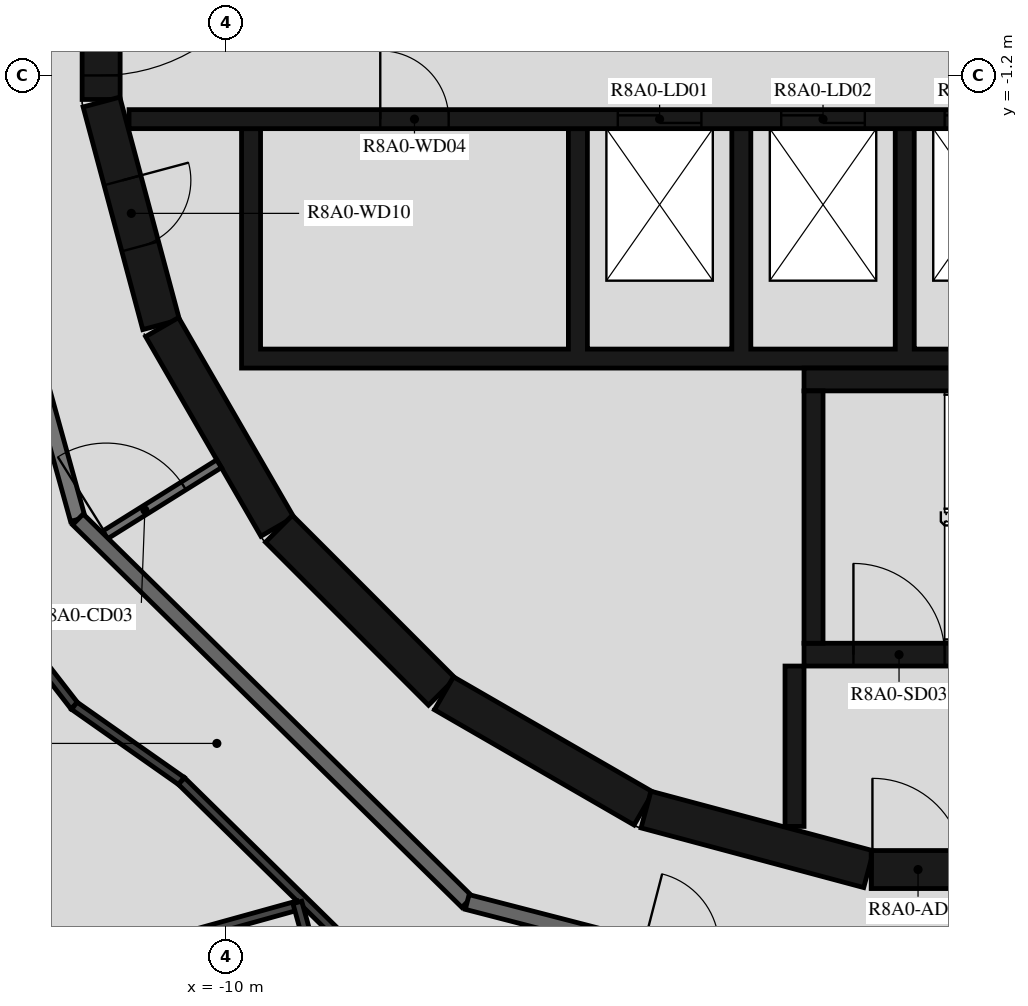
"""IFC4 building model, lengths in metres.
Left out: names, types, materials, properties, quantities, classifications, styles, units other than length and angle.
Written with IfcOpenShell. Run it as: python <this file> out.ifc"""

import sys

from ifc_helpers import new_model, si_unit, direction, frame, frame_2d, origin, place, context, subcontext, project, spatial, polyline, rectangle, outline, extrude, element, fill, save


model = new_model("IFC4")
c1 = context("Model", 3, precision=1e-05, world=origin(), true_north=direction((0.0, 1.0)))
c2 = subcontext(c1, "Body", "Model", "MODEL_VIEW")
j1 = project(units=[si_unit("LENGTHUNIT", "METRE"), si_unit("PLANEANGLEUNIT", "RADIAN")], contexts=[c1])
p1 = place(None, origin())
s1 = spatial("IfcSite", under=j1, at=p1, CompositionType="ELEMENT")
p2 = place(p1, origin())
s2 = spatial("IfcBuilding", under=s1, at=p2, CompositionType="ELEMENT")
p3 = place(p2, frame((0.0, 0.0, 298.2)))
s3 = spatial("IfcBuildingStorey", under=s2, at=p3, CompositionType="ELEMENT", Elevation=298.2)
p4 = place(p3, frame((-11.647, 1.516, 0.0), z_axis=(0.0, 0.0, 1.0), x_axis=(0.0, -1.0, 0.0)))
e1 = element("IfcWall", 1, at=p4, inside=s3, PredefinedType="SHEAR", context=c2, shape_type="SweptSolid", body=[
    extrude(rectangle(XDim=3.033, YDim=0.5, at=frame_2d((1.516, 0.0))), origin(), (0.0, 0.0, 1.0), 3.12),
])
p5 = place(p4, frame((0.316, 0.0, 0.0)))
e2 = element("IfcOpeningElement", 2, at=p5, cuts=e1, PredefinedType="OPENING", context=c2, shape_type="SweptSolid", body=[
    extrude(rectangle(XDim=2.4, YDim=2.1, at=frame_2d((1.2, 1.05))), frame((0.0, 0.26, 0.0), z_axis=(0.0, -1.0, 0.0), x_axis=(1.0, 0.0, 0.0)), (0.0, 0.0, 1.0), 0.52),
])
p6 = place(p3, frame((-11.643, -1.55, 0.0), z_axis=(0.0, 0.0, 1.0), x_axis=(0.258734743916, -0.965948410781, 0.0)))
e3 = element("IfcWall", 3, at=p6, inside=s3, PredefinedType="SHEAR", context=c2, shape_type="SweptSolid", body=[
    extrude(rectangle(XDim=3.033, YDim=0.5, at=frame_2d((1.516, 0.0))), origin(), (0.0, 0.0, 1.0), 3.12),
])
p7 = place(p6, frame((1.066, 0.0, 0.0)))
e4 = element("IfcOpeningElement", 4, at=p7, cuts=e3, PredefinedType="OPENING", context=c2, shape_type="SweptSolid", body=[
    extrude(rectangle(XDim=0.9, YDim=2.1, at=frame_2d((0.45, 1.05))), frame((0.0, 0.26, 0.0), z_axis=(0.0, -1.0, 0.0), x_axis=(1.0, 0.0, 0.0)), (0.0, 0.0, 1.0), 0.52),
])
p8 = place(p3, frame((-10.845, -4.51, 0.0), z_axis=(0.0, 0.0, 1.0), x_axis=(0.500087131594, -0.865975092491, 0.0)))
e5 = element("IfcWall", 5, at=p8, inside=s3, PredefinedType="SHEAR", context=c2, shape_type="SweptSolid", body=[
    extrude(rectangle(XDim=3.033, YDim=0.5, at=frame_2d((1.516, 0.0))), origin(), (0.0, 0.0, 1.0), 3.12),
])
p9 = place(p3, frame((-9.308, -7.164, 0.0), z_axis=(0.0, 0.0, 1.0), x_axis=(0.707106781187, -0.707106781187, 0.0)))
e6 = element("IfcWall", 6, at=p9, inside=s3, PredefinedType="SHEAR", context=c2, shape_type="SweptSolid", body=[
    extrude(rectangle(XDim=3.032, YDim=0.5, at=frame_2d((1.516, 0.0))), origin(), (0.0, 0.0, 1.0), 3.12),
])
for number, where, z_axis, x_axis in (
    (7, (-7.137, -9.329, 0.0), (0.0, 0.0, 1.0), (0.866, -0.5, 0.0)),
    (8, (-4.479, -10.858, 0.0), (0.0, 0.0, 1.0), (0.966, -0.259, 0.0)),
):
    element("IfcWall", number, at=place(p3, frame(where, z_axis=z_axis, x_axis=x_axis)), inside=s3, PredefinedType="SHEAR", context=c2, shape_type="SweptSolid", body=[
        extrude(rectangle(XDim=3.033, YDim=0.5, at=frame_2d((1.516, 0.0))), origin(), (0.0, 0.0, 1.0), 3.12),
    ])
p10 = place(p3, frame((-1.516, -11.647, 0.0), z_axis=(0.0, 0.0, 1.0), x_axis=(1.0, 0.0, 0.0)))
e9 = element("IfcWall", 9, at=p10, inside=s3, PredefinedType="SHEAR", context=c2, shape_type="SweptSolid", body=[
    extrude(rectangle(XDim=3.033, YDim=0.5, at=frame_2d((1.516, 0.0))), origin(), (0.0, 0.0, 1.0), 3.12),
])
p11 = place(p10, frame((0.016, 0.0, 0.0)))
e10 = element("IfcOpeningElement", 10, at=p11, cuts=e9, PredefinedType="OPENING", context=c2, shape_type="SweptSolid", body=[
    extrude(rectangle(XDim=1.2, YDim=2.1, at=frame_2d((0.6, 1.05))), frame((0.0, 0.26, 0.0), z_axis=(0.0, -1.0, 0.0), x_axis=(1.0, 0.0, 0.0)), (0.0, 0.0, 1.0), 0.52),
])
p12 = place(p3, frame((-2.275, -8.67, 0.0), z_axis=(0.0, 0.0, 1.0), x_axis=(0.0, 1.0, 0.0)))
e11 = element("IfcWall", 11, at=p12, inside=s3, PredefinedType="SHEAR", context=c2, shape_type="SweptSolid", body=[
    extrude(rectangle(XDim=3.32, YDim=0.25, at=frame_2d((1.66, 0.0))), origin(), (0.0, 0.0, 1.0), 3.12),
])
p13 = place(p3, frame((-2.4, -5.2, 0.0), z_axis=(0.0, 0.0, 1.0), x_axis=(1.0, 0.0, 0.0)))
e12 = element("IfcWall", 12, at=p13, inside=s3, PredefinedType="SHEAR", context=c2, shape_type="SweptSolid", body=[
    extrude(rectangle(XDim=7.05, YDim=0.3, at=frame_2d((3.525, 0.0))), origin(), (0.0, 0.0, 1.0), 3.12),
])
p14 = place(p3, frame((-2.4, -8.82, 0.0), z_axis=(0.0, 0.0, 1.0), x_axis=(1.0, 0.0, 0.0)))
e13 = element("IfcWall", 13, at=p14, inside=s3, PredefinedType="SHEAR", context=c2, shape_type="SweptSolid", body=[
    extrude(rectangle(XDim=2.5, YDim=0.3, at=frame_2d((1.25, 0.0))), origin(), (0.0, 0.0, 1.0), 3.12),
])
p15 = place(p14, frame((0.65, 0.0, 0.0)))
e14 = element("IfcOpeningElement", 14, at=p15, cuts=e13, PredefinedType="OPENING", context=c2, shape_type="SweptSolid", body=[
    extrude(rectangle(XDim=1.2, YDim=2.1, at=frame_2d((0.6, 1.05))), frame((0.0, 0.16, 0.0), z_axis=(0.0, -1.0, 0.0), x_axis=(1.0, 0.0, 0.0)), (0.0, 0.0, 1.0), 0.32),
])
p16 = place(p3, frame((-2.525, -8.97, 0.0), z_axis=(0.0, 0.0, 1.0), x_axis=(0.0, -1.0, 0.0)))
e15 = element("IfcWall", 15, at=p16, inside=s3, PredefinedType="SHEAR", context=c2, shape_type="SweptSolid", body=[
    extrude(rectangle(XDim=2.11, YDim=0.25, at=frame_2d((1.055, 0.0))), origin(), (0.0, 0.0, 1.0), 3.12),
])
p17 = place(p3, origin())
e16 = element("IfcWall", 16, at=p17, inside=s3, PredefinedType="SHEAR", context=c2, shape_type="SweptSolid", body=[
    extrude(outline(polyline([(9.8, -5.05), (9.8, -4.8), (9.8, -1.9), (9.55, -1.9), (9.55, -4.8), (7.65, -4.8), (7.65, -1.9), (7.4, -1.9), (7.4, -4.8), (5.5, -4.8), (5.5, -1.9), (5.25, -1.9), (5.25, -4.8), (3.35, -4.8), (3.35, -1.9), (3.1, -1.9), (3.1, -4.8), (1.2, -4.8), (1.2, -1.9), (0.95, -1.9), (0.95, -4.8), (-0.95, -4.8), (-0.95, -1.9), (-1.2, -1.9), (-1.2, -4.8), (-3.1, -4.8), (-3.1, -1.9), (-3.35, -1.9), (-3.35, -4.8), (-5.25, -4.8), (-5.25, -1.9), (-5.5, -1.9), (-5.5, -4.8), (-9.55, -4.8), (-9.55, -1.9), (-9.8, -1.9), (-9.8, -4.8), (-9.8, -5.05), (9.8, -5.05)])), origin(), (0.0, 0.0, 1.0), 3.12),
])
p18 = place(p3, frame((-11.28, -1.775, 0.0), z_axis=(0.0, 0.0, 1.0), x_axis=(1.0, 0.0, 0.0)))
e17 = element("IfcWall", 17, at=p18, inside=s3, PredefinedType="SHEAR", context=c2, shape_type="SweptSolid", body=[
    extrude(rectangle(XDim=14.38, YDim=0.25, at=frame_2d((7.19, 0.0))), origin(), (0.0, 0.0, 1.0), 3.12),
])
p19 = place(p18, frame((6.43, 0.0, 0.0)))
e18 = element("IfcOpeningElement", 18, at=p19, cuts=e17, PredefinedType="OPENING", context=c2, shape_type="SweptSolid", body=[
    extrude(rectangle(XDim=1.1, YDim=2.1, at=frame_2d((0.55, 1.05))), frame((0.0, 0.135, 0.0), z_axis=(0.0, -1.0, 0.0), x_axis=(1.0, 0.0, 0.0)), (0.0, 0.0, 1.0), 0.27),
])
p20 = place(p18, frame((8.58, 0.0, 0.0)))
e19 = element("IfcOpeningElement", 19, at=p20, cuts=e17, PredefinedType="OPENING", context=c2, shape_type="SweptSolid", body=[
    extrude(rectangle(XDim=1.1, YDim=2.1, at=frame_2d((0.55, 1.05))), frame((0.0, 0.135, 0.0), z_axis=(0.0, -1.0, 0.0), x_axis=(1.0, 0.0, 0.0)), (0.0, 0.0, 1.0), 0.27),
])
p21 = place(p18, frame((10.73, 0.0, 0.0)))
e20 = element("IfcOpeningElement", 20, at=p21, cuts=e17, PredefinedType="OPENING", context=c2, shape_type="SweptSolid", body=[
    extrude(rectangle(XDim=1.1, YDim=2.1, at=frame_2d((0.55, 1.05))), frame((0.0, 0.135, 0.0), z_axis=(0.0, -1.0, 0.0), x_axis=(1.0, 0.0, 0.0)), (0.0, 0.0, 1.0), 0.27),
])
p22 = place(p18, frame((3.305, 0.0, 0.0)))
e21 = element("IfcOpeningElement", 21, at=p22, cuts=e17, PredefinedType="OPENING", context=c2, shape_type="SweptSolid", body=[
    extrude(rectangle(XDim=0.9, YDim=2.1, at=frame_2d((0.45, 1.05))), frame((0.0, 0.135, 0.0), z_axis=(0.0, -1.0, 0.0), x_axis=(1.0, 0.0, 0.0)), (0.0, 0.0, 1.0), 0.27),
])
p23 = place(p18, frame((12.98, 0.0, 0.0)))
e22 = element("IfcOpeningElement", 22, at=p23, cuts=e17, PredefinedType="OPENING", context=c2, shape_type="SweptSolid", body=[
    extrude(rectangle(XDim=0.9, YDim=2.1, at=frame_2d((0.45, 1.05))), frame((0.0, 0.135, 0.0), z_axis=(0.0, -1.0, 0.0), x_axis=(1.0, 0.0, 0.0)), (0.0, 0.0, 1.0), 0.27),
])
p24 = place(p3, frame((-11.687, -7.303, 0.0), z_axis=(0.0, 0.0, 1.0), x_axis=(0.848064094072, 0.529893661357, 0.0)))
e23 = element("IfcWall", 23, at=p24, inside=s3, PredefinedType="PARTITIONING", context=c2, shape_type="SweptSolid", body=[
    extrude(rectangle(XDim=1.876, YDim=0.12, at=frame_2d((0.938, 0.0))), origin(), (0.0, 0.0, 1.0), 3.12),
])
p25 = place(p24, frame((0.125, 0.0, 0.0)))
e24 = element("IfcOpeningElement", 24, at=p25, cuts=e23, PredefinedType="OPENING", context=c2, shape_type="SweptSolid", body=[
    extrude(rectangle(XDim=1.2, YDim=2.1, at=frame_2d((0.6, 1.05))), frame((0.0, 0.07, 0.0), z_axis=(0.0, -1.0, 0.0), x_axis=(1.0, 0.0, 0.0)), (0.0, 0.0, 1.0), 0.14),
])
p26 = place(p3, frame((-13.872, -0.121, 0.0), z_axis=(0.0, 0.0, 1.0), x_axis=(0.267254575108, -0.963625960674, 0.0)))
e25 = element("IfcWall", 25, at=p26, inside=s3, PredefinedType="STANDARD", context=c2, shape_type="SweptSolid", body=[
    extrude(rectangle(XDim=7.181, YDim=0.2, at=frame_2d((3.591, 0.0))), origin(), (0.0, 0.0, 1.0), 3.12),
])
p27 = place(p3, frame((-11.953, -7.041, 0.0), z_axis=(0.0, 0.0, 1.0), x_axis=(0.713250549143, -0.70090916255, 0.0)))
e26 = element("IfcWall", 26, at=p27, inside=s3, PredefinedType="STANDARD", context=c2, shape_type="SweptSolid", body=[
    extrude(rectangle(XDim=7.181, YDim=0.2, at=frame_2d((3.59, 0.0))), origin(), (0.0, 0.0, 1.0), 3.12),
])
p28 = place(p3, frame((-6.831, -12.074, 0.0), z_axis=(0.0, 0.0, 1.0), x_axis=(0.968144780225, -0.250391063186, 0.0)))
e27 = element("IfcWall", 27, at=p28, inside=s3, PredefinedType="STANDARD", context=c2, shape_type="SweptSolid", body=[
    extrude(rectangle(XDim=7.181, YDim=0.2, at=frame_2d((3.591, 0.0))), origin(), (0.0, 0.0, 1.0), 3.12),
])
p29 = place(p28, frame((2.39, 0.0, 0.0)))
e28 = element("IfcOpeningElement", 28, at=p29, cuts=e27, PredefinedType="OPENING", context=c2, shape_type="SweptSolid", body=[
    extrude(rectangle(XDim=1.0, YDim=2.1, at=frame_2d((0.5, 1.05))), frame((0.0, 0.11, 0.0), z_axis=(0.0, -1.0, 0.0), x_axis=(1.0, 0.0, 0.0)), (0.0, 0.0, 1.0), 0.22),
])
p30 = place(p28, frame((5.69, 0.0, 0.0)))
e29 = element("IfcOpeningElement", 29, at=p30, cuts=e27, PredefinedType="OPENING", context=c2, shape_type="SweptSolid", body=[
    extrude(rectangle(XDim=1.0, YDim=2.1, at=frame_2d((0.5, 1.05))), frame((0.0, 0.11, 0.0), z_axis=(0.0, -1.0, 0.0), x_axis=(1.0, 0.0, 0.0)), (0.0, 0.0, 1.0), 0.22),
])
p31 = place(p3, frame((-13.291, -7.829, 0.0), z_axis=(0.0, 0.0, 1.0), x_axis=(0.613017069232, -0.790069663277, 0.0)))
e30 = element("IfcWall", 30, at=p31, inside=s3, PredefinedType="PARTITIONING", context=c2, shape_type="SweptSolid", body=[
    extrude(rectangle(XDim=2.106, YDim=0.12, at=frame_2d((1.053, 0.0))), origin(), (0.0, 0.0, 1.0), 3.12),
])
p32 = place(p3, frame((-12.0, -9.493, 0.0), z_axis=(0.0, 0.0, 1.0), x_axis=(0.818312362022, -0.57477376259, 0.0)))
e31 = element("IfcWall", 31, at=p32, inside=s3, PredefinedType="PARTITIONING", context=c2, shape_type="SweptSolid", body=[
    extrude(rectangle(XDim=1.723, YDim=0.12, at=frame_2d((0.862, 0.0))), origin(), (0.0, 0.0, 1.0), 3.12),
])
p33 = place(p3, frame((-10.59, -10.483, 0.0), z_axis=(0.0, 0.0, 1.0), x_axis=(0.713244109461, -0.70091571556, 0.0)))
e32 = element("IfcWall", 32, at=p33, inside=s3, PredefinedType="PARTITIONING", context=c2, shape_type="SweptSolid", body=[
    extrude(rectangle(XDim=4.198, YDim=0.12, at=frame_2d((2.099, 0.0))), origin(), (0.0, 0.0, 1.0), 3.12),
])
p34 = place(p3, frame((-14.066, -13.508, 0.0), z_axis=(0.0, 0.0, 1.0), x_axis=(0.963643585504, 0.267191018032, 0.0)))
e33 = element("IfcWall", 33, at=p34, inside=s3, PredefinedType="PARTITIONING", context=c2, shape_type="SweptSolid", body=[
    extrude(rectangle(XDim=5.2, YDim=0.12, at=frame_2d((2.6, 0.0))), origin(), (0.0, 0.0, 1.0), 2.73),
])
p35 = place(p3, frame((-7.368, -18.202, 0.0), z_axis=(0.0, 0.0, 1.0), x_axis=(-0.26723158658, 0.963632336077, 0.0)))
e34 = element("IfcWall", 34, at=p35, inside=s3, PredefinedType="PARTITIONING", context=c2, shape_type="SweptSolid", body=[
    extrude(rectangle(XDim=6.353, YDim=0.12, at=frame_2d((3.177, 0.0))), origin(), (0.0, 0.0, 1.0), 3.12),
])
p36 = place(p35, frame((2.956, 0.0, 0.0)))
e35 = element("IfcOpeningElement", 35, at=p36, cuts=e34, PredefinedType="OPENING", context=c2, shape_type="SweptSolid", body=[
    extrude(rectangle(XDim=0.9, YDim=2.1, at=frame_2d((0.45, 1.05))), frame((0.0, 0.07, 0.0), z_axis=(0.0, -1.0, 0.0), x_axis=(1.0, 0.0, 0.0)), (0.0, 0.0, 1.0), 0.14),
])
p37 = place(p15, origin())
e36 = element("IfcDoor", 36, at=p37, inside=s3, OperationType="SINGLE_SWING_LEFT", PredefinedType="DOOR", context=c2, shape_type="SweptSolid", body=[
    extrude(rectangle(XDim=1.2, YDim=2.1, at=frame_2d((0.6, 1.05))), frame((0.0, 0.025, 0.0), z_axis=(0.0, -1.0, 0.0), x_axis=(1.0, 0.0, 0.0)), (0.0, 0.0, 1.0), 0.05),
])
fill(e14, e36)
p38 = place(p11, origin())
e37 = element("IfcDoor", 37, at=p38, inside=s3, OperationType="SINGLE_SWING_RIGHT", PredefinedType="DOOR", context=c2, shape_type="SweptSolid", body=[
    extrude(rectangle(XDim=1.2, YDim=2.1, at=frame_2d((0.6, 1.05))), frame((0.0, 0.025, 0.0), z_axis=(0.0, -1.0, 0.0), x_axis=(1.0, 0.0, 0.0)), (0.0, 0.0, 1.0), 0.05),
])
fill(e10, e37)
p39 = place(p5, origin())
e38 = element("IfcDoor", 38, at=p39, inside=s3, OperationType="DOUBLE_DOOR_SINGLE_SWING", PredefinedType="DOOR", context=c2, shape_type="SweptSolid", body=[
    extrude(rectangle(XDim=2.4, YDim=2.1, at=frame_2d((1.2, 1.05))), frame((0.0, 0.025, 0.0), z_axis=(0.0, -1.0, 0.0), x_axis=(1.0, 0.0, 0.0)), (0.0, 0.0, 1.0), 0.05),
])
fill(e2, e38)
p40 = place(p19, origin())
e39 = element("IfcDoor", 39, at=p40, inside=s3, OperationType="DOUBLE_DOOR_SLIDING", PredefinedType="DOOR", context=c2, shape_type="SweptSolid", body=[
    extrude(rectangle(XDim=1.1, YDim=2.1, at=frame_2d((0.55, 1.05))), frame((0.0, 0.025, 0.0), z_axis=(0.0, -1.0, 0.0), x_axis=(1.0, 0.0, 0.0)), (0.0, 0.0, 1.0), 0.05),
])
fill(e18, e39)
p41 = place(p20, origin())
e40 = element("IfcDoor", 40, at=p41, inside=s3, OperationType="DOUBLE_DOOR_SLIDING", PredefinedType="DOOR", context=c2, shape_type="SweptSolid", body=[
    extrude(rectangle(XDim=1.1, YDim=2.1, at=frame_2d((0.55, 1.05))), frame((0.0, 0.025, 0.0), z_axis=(0.0, -1.0, 0.0), x_axis=(1.0, 0.0, 0.0)), (0.0, 0.0, 1.0), 0.05),
])
fill(e19, e40)
p42 = place(p21, origin())
e41 = element("IfcDoor", 41, at=p42, inside=s3, OperationType="DOUBLE_DOOR_SLIDING", PredefinedType="DOOR", context=c2, shape_type="SweptSolid", body=[
    extrude(rectangle(XDim=1.1, YDim=2.1, at=frame_2d((0.55, 1.05))), frame((0.0, 0.025, 0.0), z_axis=(0.0, -1.0, 0.0), x_axis=(1.0, 0.0, 0.0)), (0.0, 0.0, 1.0), 0.05),
])
fill(e20, e41)
p43 = place(p22, origin())
e42 = element("IfcDoor", 42, at=p43, inside=s3, OperationType="SINGLE_SWING_RIGHT", PredefinedType="DOOR", context=c2, shape_type="SweptSolid", body=[
    extrude(rectangle(XDim=0.9, YDim=2.1, at=frame_2d((0.45, 1.05))), frame((0.0, 0.025, 0.0), z_axis=(0.0, -1.0, 0.0), x_axis=(1.0, 0.0, 0.0)), (0.0, 0.0, 1.0), 0.05),
])
fill(e21, e42)
p44 = place(p7, origin())
e43 = element("IfcDoor", 43, at=p44, inside=s3, OperationType="SINGLE_SWING_RIGHT", PredefinedType="DOOR", context=c2, shape_type="SweptSolid", body=[
    extrude(rectangle(XDim=0.9, YDim=2.1, at=frame_2d((0.45, 1.05))), frame((0.0, 0.025, 0.0), z_axis=(0.0, -1.0, 0.0), x_axis=(1.0, 0.0, 0.0)), (0.0, 0.0, 1.0), 0.05),
])
fill(e4, e43)
p45 = place(p25, origin())
e44 = element("IfcDoor", 44, at=p45, inside=s3, OperationType="DOUBLE_DOOR_SINGLE_SWING", PredefinedType="DOOR", context=c2, shape_type="SweptSolid", body=[
    extrude(rectangle(XDim=1.2, YDim=2.1, at=frame_2d((0.6, 1.05))), frame((0.0, 0.025, 0.0), z_axis=(0.0, -1.0, 0.0), x_axis=(1.0, 0.0, 0.0)), (0.0, 0.0, 1.0), 0.05),
])
fill(e24, e44)
save(model, sys.argv[1])
